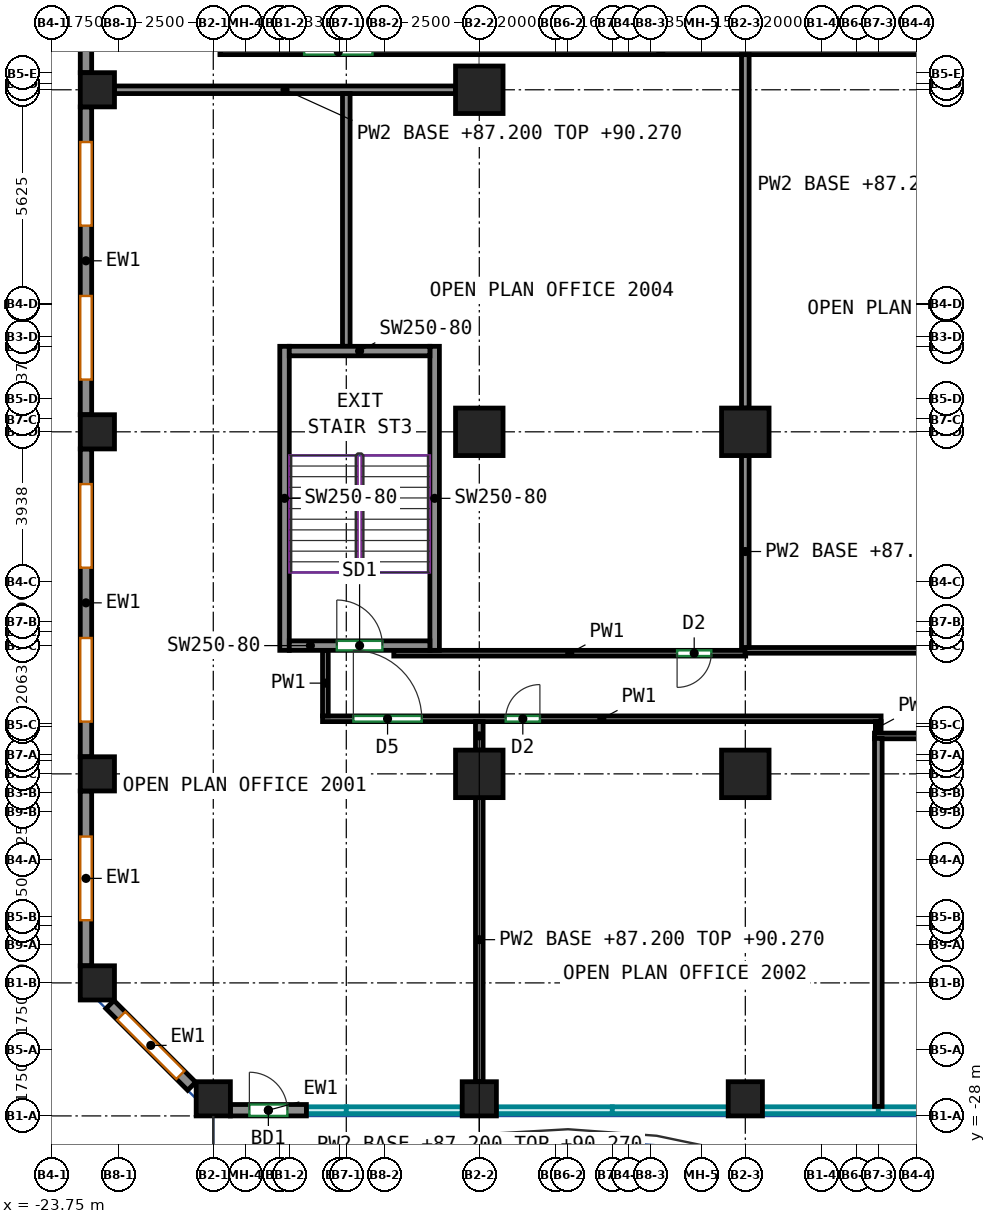
"""IFC4 building model, lengths in metres.
Left out: names, types, materials, properties, quantities, classifications, styles, units other than length and angle.
Written with IfcOpenShell. Run it as: python <this file> out.ifc"""

import sys

from ifc_helpers import new_model, si_unit, direction, frame, frame_2d, origin, origin_2d, place, context, subcontext, project, spatial, rectangle, extrude, source, transform, mapped, element, fill, save


model = new_model("IFC4")
c1 = context("Model", 3, precision=1e-05, world=origin(), true_north=direction((0.0, 1.0)))
c2 = subcontext(c1, "Body", "Model", "MODEL_VIEW")
j1 = project(units=[si_unit("LENGTHUNIT", "METRE"), si_unit("PLANEANGLEUNIT", "RADIAN")], contexts=[c1])
p1 = place(None, origin())
s1 = spatial("IfcSite", under=j1, at=p1, CompositionType="ELEMENT")
p2 = place(p1, origin())
s2 = spatial("IfcBuilding", under=s1, at=p2, CompositionType="ELEMENT")
p3 = place(p2, frame((0.0, 0.0, 87.2)))
s3 = spatial("IfcBuildingStorey", under=s2, at=p3, CompositionType="ELEMENT", Elevation=87.2)
m1 = source(origin(), c2, "Body", "SweptSolid", [
    extrude(rectangle(XDim=0.9, YDim=0.9, at=origin_2d()), origin(), (0.0, 0.0, 1.0), 3.72),
])
for number, where, z_axis, x_axis in (
    (1, (-22.55, -24.5, 0.0), (0.0, 0.0, 1.0), (1.0, 0.0, 0.0)),
    (2, (-22.55, -19.0, 0.0), (0.0, 0.0, 1.0), (1.0, 0.0, 0.0)),
    (3, (-22.55, -10.0, 0.0), (0.0, 0.0, 1.0), (1.0, 0.0, 0.0)),
    (4, (-22.55, -1.0, 0.0), (0.0, 0.0, 1.0), (1.0, 0.0, 0.0)),
    (5, (-19.5, -27.55, 0.0), (0.0, 0.0, 1.0), (1.0, 0.0, 0.0)),
    (6, (-12.5, -27.55, 0.0), (0.0, 0.0, 1.0), (1.0, 0.0, 0.0)),
):
    element("IfcColumn", number, at=place(p3, frame(where, z_axis=z_axis, x_axis=x_axis)), inside=s3, PredefinedType="COLUMN", context=c2, shape_type="MappedRepresentation", body=[
        mapped(m1, transform((0.0, 0.0, 0.0))),
    ])
m2 = source(origin(), c2, "Body", "SweptSolid", [
    extrude(rectangle(XDim=1.25, YDim=1.25, at=origin_2d()), origin(), (0.0, 0.0, 1.0), 3.72),
])
for number, where, z_axis, x_axis in (
    (7, (-12.5, -19.0, 0.0), (0.0, 0.0, 1.0), (1.0, 0.0, 0.0)),
    (8, (-12.5, -10.0, 0.0), (0.0, 0.0, 1.0), (1.0, 0.0, 0.0)),
    (9, (-12.5, -1.0, 0.0), (0.0, 0.0, 1.0), (1.0, 0.0, 0.0)),
):
    element("IfcColumn", number, at=place(p3, frame(where, z_axis=z_axis, x_axis=x_axis)), inside=s3, PredefinedType="COLUMN", context=c2, shape_type="MappedRepresentation", body=[
        mapped(m2, transform((0.0, 0.0, 0.0))),
    ])
p4 = place(p3, frame((-5.5, -27.55, 0.0), z_axis=(0.0, 0.0, 1.0), x_axis=(1.0, 0.0, 0.0)))
e10 = element("IfcColumn", 10, at=p4, inside=s3, PredefinedType="COLUMN", context=c2, shape_type="MappedRepresentation", body=[
    mapped(m1, transform((0.0, 0.0, 0.0))),
])
for number, where, z_axis, x_axis in (
    (11, (-5.5, -19.0, 0.0), (0.0, 0.0, 1.0), (1.0, 0.0, 0.0)),
    (12, (-5.5, -10.0, 0.0), (0.0, 0.0, 1.0), (1.0, 0.0, 0.0)),
):
    element("IfcColumn", number, at=place(p3, frame(where, z_axis=z_axis, x_axis=x_axis)), inside=s3, PredefinedType="COLUMN", context=c2, shape_type="MappedRepresentation", body=[
        mapped(m2, transform((0.0, 0.0, 0.0))),
    ])
m3 = source(origin(), c2, "Body", "SweptSolid", [
    extrude(rectangle(XDim=8.0, YDim=0.25, at=frame_2d((4.0, 0.0))), origin(), (0.0, 0.0, 1.0), 3.72),
])
for number, where, z_axis, x_axis in (
    (13, (-17.625, -15.75, 0.0), (0.0, 0.0, 1.0), (0.0, 1.0, 0.0)),
    (14, (-13.675, -15.75, 0.0), (0.0, 0.0, 1.0), (0.0, 1.0, 0.0)),
):
    element("IfcWall", number, at=place(p3, frame(where, z_axis=z_axis, x_axis=x_axis)), inside=s3, PredefinedType="SHEAR", context=c2, shape_type="MappedRepresentation", body=[
        mapped(m3, transform((0.0, 0.0, 0.0))),
    ])
m4 = source(origin(), c2, "Body", "SweptSolid", [
    extrude(rectangle(XDim=3.7, YDim=0.25, at=frame_2d((1.85, 0.0))), origin(), (0.0, 0.0, 1.0), 3.72),
])
p5 = place(p3, frame((-17.5, -15.625, 0.0), z_axis=(0.0, 0.0, 1.0), x_axis=(1.0, 0.0, 0.0)))
e15 = element("IfcWall", 15, at=p5, inside=s3, PredefinedType="SHEAR", context=c2, shape_type="MappedRepresentation", body=[
    mapped(m4, transform((0.0, 0.0, 0.0))),
])
p6 = place(p5, frame((1.25, 0.0, 0.0)))
e16 = element("IfcOpeningElement", 16, at=p6, cuts=e15, PredefinedType="OPENING", context=c2, shape_type="SweptSolid", body=[
    extrude(rectangle(XDim=1.2, YDim=2.1, at=frame_2d((0.6, 1.05))), frame((0.0, 0.135, 0.0), z_axis=(0.0, -1.0, 0.0), x_axis=(1.0, 0.0, 0.0)), (0.0, 0.0, 1.0), 0.27),
])
p7 = place(p3, frame((-17.5, -7.875, 0.0), z_axis=(0.0, 0.0, 1.0), x_axis=(1.0, 0.0, 0.0)))
e17 = element("IfcWall", 17, at=p7, inside=s3, PredefinedType="SHEAR", context=c2, shape_type="MappedRepresentation", body=[
    mapped(m4, transform((0.0, 0.0, 0.0))),
])
m5 = source(origin(), c2, "Body", "SweptSolid", [
    extrude(rectangle(XDim=2.0, YDim=0.3, at=frame_2d((1.0, 0.0))), origin(), (0.0, 0.0, 1.0), 3.72),
])
p8 = place(p3, frame((-19.05, -27.85, 0.0), z_axis=(0.0, 0.0, 1.0), x_axis=(1.0, 0.0, 0.0)))
e18 = element("IfcWall", 18, at=p8, inside=s3, PredefinedType="SOLIDWALL", context=c2, shape_type="MappedRepresentation", body=[
    mapped(m5, transform((0.0, 0.0, 0.0))),
])
p9 = place(p8, frame((0.5, 0.0, 0.0)))
e19 = element("IfcOpeningElement", 19, at=p9, cuts=e18, PredefinedType="OPENING", context=c2, shape_type="SweptSolid", body=[
    extrude(rectangle(XDim=1.0, YDim=2.1, at=frame_2d((0.5, 1.05))), frame((0.0, 0.16, 0.0), z_axis=(0.0, -1.0, 0.0), x_axis=(1.0, 0.0, 0.0)), (0.0, 0.0, 1.0), 0.32),
])
m6 = source(origin(), c2, "Body", "SweptSolid", [
    extrude(rectangle(XDim=8.1, YDim=0.3, at=frame_2d((4.05, 0.0))), origin(), (0.0, 0.0, 1.0), 3.72),
])
p10 = place(p3, frame((-22.85, 7.55, 0.0), z_axis=(0.0, 0.0, 1.0), x_axis=(0.0, -1.0, 0.0)))
e20 = element("IfcWall", 20, at=p10, inside=s3, PredefinedType="SOLIDWALL", context=c2, shape_type="MappedRepresentation", body=[
    mapped(m6, transform((0.0, 0.0, 0.0))),
])
p11 = place(p10, frame((0.925, 0.0, 0.7)))
e21 = element("IfcOpeningElement", 21, at=p11, cuts=e20, PredefinedType="OPENING", context=c2, shape_type="SweptSolid", body=[
    extrude(rectangle(XDim=2.2, YDim=2.25, at=frame_2d((1.1, 1.125))), frame((0.0, 0.16, 0.0), z_axis=(0.0, -1.0, 0.0), x_axis=(1.0, 0.0, 0.0)), (0.0, 0.0, 1.0), 0.32),
])
p12 = place(p10, frame((4.975, 0.0, 0.7)))
e22 = element("IfcOpeningElement", 22, at=p12, cuts=e20, PredefinedType="OPENING", context=c2, shape_type="SweptSolid", body=[
    extrude(rectangle(XDim=2.2, YDim=2.25, at=frame_2d((1.1, 1.125))), frame((0.0, 0.16, 0.0), z_axis=(0.0, -1.0, 0.0), x_axis=(1.0, 0.0, 0.0)), (0.0, 0.0, 1.0), 0.32),
])
p13 = place(p3, frame((-22.85, -1.45, 0.0), z_axis=(0.0, 0.0, 1.0), x_axis=(0.0, -1.0, 0.0)))
e23 = element("IfcWall", 23, at=p13, inside=s3, PredefinedType="SOLIDWALL", context=c2, shape_type="MappedRepresentation", body=[
    mapped(m6, transform((0.0, 0.0, 0.0))),
])
p14 = place(p13, frame((0.925, 0.0, 0.7)))
e24 = element("IfcOpeningElement", 24, at=p14, cuts=e23, PredefinedType="OPENING", context=c2, shape_type="SweptSolid", body=[
    extrude(rectangle(XDim=2.2, YDim=2.25, at=frame_2d((1.1, 1.125))), frame((0.0, 0.16, 0.0), z_axis=(0.0, -1.0, 0.0), x_axis=(1.0, 0.0, 0.0)), (0.0, 0.0, 1.0), 0.32),
])
p15 = place(p13, frame((4.975, 0.0, 0.7)))
e25 = element("IfcOpeningElement", 25, at=p15, cuts=e23, PredefinedType="OPENING", context=c2, shape_type="SweptSolid", body=[
    extrude(rectangle(XDim=2.2, YDim=2.25, at=frame_2d((1.1, 1.125))), frame((0.0, 0.16, 0.0), z_axis=(0.0, -1.0, 0.0), x_axis=(1.0, 0.0, 0.0)), (0.0, 0.0, 1.0), 0.32),
])
p16 = place(p3, frame((-22.85, -10.45, 0.0), z_axis=(0.0, 0.0, 1.0), x_axis=(0.0, -1.0, 0.0)))
e26 = element("IfcWall", 26, at=p16, inside=s3, PredefinedType="SOLIDWALL", context=c2, shape_type="MappedRepresentation", body=[
    mapped(m6, transform((0.0, 0.0, 0.0))),
])
p17 = place(p16, frame((0.925, 0.0, 0.7)))
e27 = element("IfcOpeningElement", 27, at=p17, cuts=e26, PredefinedType="OPENING", context=c2, shape_type="SweptSolid", body=[
    extrude(rectangle(XDim=2.2, YDim=2.25, at=frame_2d((1.1, 1.125))), frame((0.0, 0.16, 0.0), z_axis=(0.0, -1.0, 0.0), x_axis=(1.0, 0.0, 0.0)), (0.0, 0.0, 1.0), 0.32),
])
p18 = place(p16, frame((4.975, 0.0, 0.7)))
e28 = element("IfcOpeningElement", 28, at=p18, cuts=e26, PredefinedType="OPENING", context=c2, shape_type="SweptSolid", body=[
    extrude(rectangle(XDim=2.2, YDim=2.25, at=frame_2d((1.1, 1.125))), frame((0.0, 0.16, 0.0), z_axis=(0.0, -1.0, 0.0), x_axis=(1.0, 0.0, 0.0)), (0.0, 0.0, 1.0), 0.32),
])
m7 = source(origin(), c2, "Body", "SweptSolid", [
    extrude(rectangle(XDim=4.6, YDim=0.3, at=frame_2d((2.3, 0.0))), origin(), (0.0, 0.0, 1.0), 3.72),
])
p19 = place(p3, frame((-22.85, -19.45, 0.0), z_axis=(0.0, 0.0, 1.0), x_axis=(0.0, -1.0, 0.0)))
e29 = element("IfcWall", 29, at=p19, inside=s3, PredefinedType="SOLIDWALL", context=c2, shape_type="MappedRepresentation", body=[
    mapped(m7, transform((0.0, 0.0, 0.0))),
])
p20 = place(p19, frame((1.2, 0.0, 0.7)))
e30 = element("IfcOpeningElement", 30, at=p20, cuts=e29, PredefinedType="OPENING", context=c2, shape_type="SweptSolid", body=[
    extrude(rectangle(XDim=2.2, YDim=2.25, at=frame_2d((1.1, 1.125))), frame((0.0, 0.16, 0.0), z_axis=(0.0, -1.0, 0.0), x_axis=(1.0, 0.0, 0.0)), (0.0, 0.0, 1.0), 0.32),
])
m8 = source(origin(), c2, "Body", "SweptSolid", [
    extrude(rectangle(XDim=3.041, YDim=0.3, at=frame_2d((1.521, 0.0))), origin(), (0.0, 0.0, 1.0), 3.72),
])
p21 = place(p3, frame((-22.219, -25.069, 0.0), z_axis=(0.0, 0.0, 1.0), x_axis=(0.707106781187, -0.707106781187, 0.0)))
e31 = element("IfcWall", 31, at=p21, inside=s3, PredefinedType="SOLIDWALL", context=c2, shape_type="MappedRepresentation", body=[
    mapped(m8, transform((0.0, 0.0, 0.0))),
])
p22 = place(p21, frame((0.42, 0.0, 0.7)))
e32 = element("IfcOpeningElement", 32, at=p22, cuts=e31, PredefinedType="OPENING", context=c2, shape_type="SweptSolid", body=[
    extrude(rectangle(XDim=2.2, YDim=2.25, at=frame_2d((1.1, 1.125))), frame((0.0, 0.16, 0.0), z_axis=(0.0, -1.0, 0.0), x_axis=(1.0, 0.0, 0.0)), (0.0, 0.0, 1.0), 0.32),
])
p23 = place(p3, frame((-16.625, -17.55, 0.0), z_axis=(0.0, 0.0, 1.0), x_axis=(1.0, 0.0, 0.0)))
e33 = element("IfcWall", 33, at=p23, inside=s3, PredefinedType="PARTITIONING", context=c2, shape_type="SweptSolid", body=[
    extrude(rectangle(XDim=14.698, YDim=0.15, at=frame_2d((7.349, 0.0))), origin(), (0.0, 0.0, 1.0), 3.72),
])
p24 = place(p23, frame((0.811, 0.0, 0.0)))
e34 = element("IfcOpeningElement", 34, at=p24, cuts=e33, PredefinedType="OPENING", context=c2, shape_type="SweptSolid", body=[
    extrude(rectangle(XDim=1.8, YDim=2.1, at=frame_2d((0.9, 1.05))), frame((0.0, 0.085, 0.0), z_axis=(0.0, -1.0, 0.0), x_axis=(1.0, 0.0, 0.0)), (0.0, 0.0, 1.0), 0.17),
])
p25 = place(p23, frame((4.82, 0.0, 0.0)))
e35 = element("IfcOpeningElement", 35, at=p25, cuts=e33, PredefinedType="OPENING", context=c2, shape_type="SweptSolid", body=[
    extrude(rectangle(XDim=0.9, YDim=2.1, at=frame_2d((0.45, 1.05))), frame((0.0, 0.085, 0.0), z_axis=(0.0, -1.0, 0.0), x_axis=(1.0, 0.0, 0.0)), (0.0, 0.0, 1.0), 0.17),
])
p26 = place(p3, frame((-16.55, -15.75, 0.0), z_axis=(0.0, 0.0, 1.0), x_axis=(0.0, -1.0, 0.0)))
e36 = element("IfcWall", 36, at=p26, inside=s3, PredefinedType="PARTITIONING", context=c2, shape_type="SweptSolid", body=[
    extrude(rectangle(XDim=1.725, YDim=0.15, at=frame_2d((0.863, 0.0))), origin(), (0.0, 0.0, 1.0), 3.72),
])
p27 = place(p3, frame((-2.002, -17.625, 0.0), z_axis=(0.0, 0.0, 1.0), x_axis=(0.0, -1.0, 0.0)))
e37 = element("IfcWall", 37, at=p27, inside=s3, PredefinedType="PARTITIONING", context=c2, shape_type="SweptSolid", body=[
    extrude(rectangle(XDim=0.302, YDim=0.15, at=frame_2d((0.151, 0.0))), origin(), (0.0, 0.0, 1.0), 3.72),
])
p28 = place(p3, frame((-2.102, -18.002, 0.0), z_axis=(0.0, 0.0, 1.0), x_axis=(1.0, 0.0, 0.0)))
e38 = element("IfcWall", 38, at=p28, inside=s3, PredefinedType="PARTITIONING", context=c2, shape_type="SweptSolid", body=[
    extrude(rectangle(XDim=5.904, YDim=0.15, at=frame_2d((2.952, 0.0))), origin(), (0.0, 0.0, 1.0), 3.72),
])
p29 = place(p28, frame((1.901, 0.0, 0.0)))
e39 = element("IfcOpeningElement", 39, at=p29, cuts=e38, PredefinedType="OPENING", context=c2, shape_type="SweptSolid", body=[
    extrude(rectangle(XDim=0.9, YDim=2.1, at=frame_2d((0.45, 1.05))), frame((0.0, 0.085, 0.0), z_axis=(0.0, -1.0, 0.0), x_axis=(1.0, 0.0, 0.0)), (0.0, 0.0, 1.0), 0.17),
])
p30 = place(p3, frame((-19.325, 0.0, 0.0), z_axis=(0.0, 0.0, 1.0), x_axis=(1.0, 0.0, 0.0)))
e40 = element("IfcWall", 40, at=p30, inside=s3, PredefinedType="PARTITIONING", context=c2, shape_type="SweptSolid", body=[
    extrude(rectangle(XDim=23.2, YDim=0.15, at=frame_2d((11.6, 0.0))), origin(), (0.0, 0.0, 1.0), 3.72),
])
p31 = place(p30, frame((2.215, 0.0, 0.0)))
e41 = element("IfcOpeningElement", 41, at=p31, cuts=e40, PredefinedType="OPENING", context=c2, shape_type="SweptSolid", body=[
    extrude(rectangle(XDim=1.8, YDim=2.1, at=frame_2d((0.9, 1.05))), frame((0.0, 0.085, 0.0), z_axis=(0.0, -1.0, 0.0), x_axis=(1.0, 0.0, 0.0)), (0.0, 0.0, 1.0), 0.17),
])
p32 = place(p3, frame((-5.49, -15.825, 0.0), z_axis=(0.0, 0.0, 1.0), x_axis=(-1.0, 0.0, 0.0)))
e42 = element("IfcWall", 42, at=p32, inside=s3, PredefinedType="PARTITIONING", context=c2, shape_type="SweptSolid", body=[
    extrude(rectangle(XDim=9.26, YDim=0.15, at=frame_2d((4.63, 0.0))), origin(), (0.0, 0.0, 1.0), 3.72),
])
p33 = place(p32, frame((0.905, 0.0, 0.0)))
e43 = element("IfcOpeningElement", 43, at=p33, cuts=e42, PredefinedType="OPENING", context=c2, shape_type="SweptSolid", body=[
    extrude(rectangle(XDim=0.9, YDim=2.1, at=frame_2d((0.45, 1.05))), frame((0.0, 0.085, 0.0), z_axis=(0.0, -1.0, 0.0), x_axis=(1.0, 0.0, 0.0)), (0.0, 0.0, 1.0), 0.17),
])
p34 = place(p3, frame((3.875, -15.75, 0.0), z_axis=(0.0, 0.0, 1.0), x_axis=(-1.0, 0.0, 0.0)))
e44 = element("IfcWall", 44, at=p34, inside=s3, PredefinedType="PARTITIONING", context=c2, shape_type="SweptSolid", body=[
    extrude(rectangle(XDim=9.385, YDim=0.15, at=frame_2d((4.692, 0.0))), origin(), (0.0, 0.0, 1.0), 3.72),
])
p35 = place(p3, frame((-12.5, -18.375, 0.0), z_axis=(0.0, 0.0, 1.0), x_axis=(0.0, 1.0, 0.0)))
e45 = element("IfcWall", 45, at=p35, inside=s3, PredefinedType="PARTITIONING", context=c2, shape_type="SweptSolid", body=[
    extrude(rectangle(XDim=0.749, YDim=0.2, at=frame_2d((0.375, 0.0))), origin(), (0.0, 0.0, 1.0), 3.07),
])
p36 = place(p3, frame((-12.5, -27.1, 0.0), z_axis=(0.0, 0.0, 1.0), x_axis=(0.0, 1.0, 0.0)))
e46 = element("IfcWall", 46, at=p36, inside=s3, PredefinedType="PARTITIONING", context=c2, shape_type="SweptSolid", body=[
    extrude(rectangle(XDim=7.475, YDim=0.2, at=frame_2d((3.738, 0.0))), origin(), (0.0, 0.0, 1.0), 3.07),
])
p37 = place(p3, frame((-22.1, -1.0, 0.0), z_axis=(0.0, 0.0, 1.0), x_axis=(1.0, 0.0, 0.0)))
e47 = element("IfcWall", 47, at=p37, inside=s3, PredefinedType="PARTITIONING", context=c2, shape_type="SweptSolid", body=[
    extrude(rectangle(XDim=8.975, YDim=0.2, at=frame_2d((4.488, 0.0))), origin(), (0.0, 0.0, 1.0), 3.07),
])
p38 = place(p3, frame((-16.0, -7.75, 0.0), z_axis=(0.0, 0.0, 1.0), x_axis=(0.0, 1.0, 0.0)))
e48 = element("IfcWall", 48, at=p38, inside=s3, PredefinedType="PARTITIONING", context=c2, shape_type="SweptSolid", body=[
    extrude(rectangle(XDim=6.65, YDim=0.2, at=frame_2d((3.325, 0.0))), origin(), (0.0, 0.0, 1.0), 3.72),
])
p39 = place(p3, frame((-2.0, -27.75, 0.0), z_axis=(0.0, 0.0, 1.0), x_axis=(0.0, 1.0, 0.0)))
e49 = element("IfcWall", 49, at=p39, inside=s3, PredefinedType="PARTITIONING", context=c2, shape_type="SweptSolid", body=[
    extrude(rectangle(XDim=9.683, YDim=0.2, at=frame_2d((4.842, 0.0))), origin(), (0.0, 0.0, 1.0), 3.72),
])
p40 = place(p3, frame((-5.5, -9.375, 0.0), z_axis=(0.0, 0.0, 1.0), x_axis=(0.0, 1.0, 0.0)))
e50 = element("IfcWall", 50, at=p40, inside=s3, PredefinedType="PARTITIONING", context=c2, shape_type="SweptSolid", body=[
    extrude(rectangle(XDim=9.299, YDim=0.2, at=frame_2d((4.649, 0.0))), origin(), (0.0, 0.0, 1.0), 3.72),
])
p41 = place(p3, frame((-5.5, -15.674, 0.0), z_axis=(0.0, 0.0, 1.0), x_axis=(0.0, 1.0, 0.0)))
e51 = element("IfcWall", 51, at=p41, inside=s3, PredefinedType="PARTITIONING", context=c2, shape_type="SweptSolid", body=[
    extrude(rectangle(XDim=5.049, YDim=0.2, at=frame_2d((2.524, 0.0))), origin(), (0.0, 0.0, 1.0), 3.07),
])
p42 = place(p9, origin())
e52 = element("IfcDoor", 52, at=p42, inside=s3, OperationType="SINGLE_SWING_LEFT", PredefinedType="DOOR", context=c2, shape_type="SweptSolid", body=[
    extrude(rectangle(XDim=1.0, YDim=2.1, at=frame_2d((0.5, 1.05))), frame((0.0, 0.025, 0.0), z_axis=(0.0, -1.0, 0.0), x_axis=(1.0, 0.0, 0.0)), (0.0, 0.0, 1.0), 0.05),
])
fill(e19, e52)
p43 = place(p14, origin())
e53 = element("IfcWindow", 53, at=p43, inside=s3, PartitioningType="SINGLE_PANEL", PredefinedType="WINDOW", context=c2, shape_type="SweptSolid", body=[
    extrude(rectangle(XDim=2.2, YDim=2.25, at=frame_2d((1.1, 1.125))), frame((0.0, 0.03, 0.0), z_axis=(0.0, -1.0, 0.0), x_axis=(1.0, 0.0, 0.0)), (0.0, 0.0, 1.0), 0.06),
])
fill(e24, e53)
p44 = place(p15, origin())
e54 = element("IfcWindow", 54, at=p44, inside=s3, PartitioningType="SINGLE_PANEL", PredefinedType="WINDOW", context=c2, shape_type="SweptSolid", body=[
    extrude(rectangle(XDim=2.2, YDim=2.25, at=frame_2d((1.1, 1.125))), frame((0.0, 0.03, 0.0), z_axis=(0.0, -1.0, 0.0), x_axis=(1.0, 0.0, 0.0)), (0.0, 0.0, 1.0), 0.06),
])
fill(e25, e54)
p45 = place(p17, origin())
e55 = element("IfcWindow", 55, at=p45, inside=s3, PartitioningType="SINGLE_PANEL", PredefinedType="WINDOW", context=c2, shape_type="SweptSolid", body=[
    extrude(rectangle(XDim=2.2, YDim=2.25, at=frame_2d((1.1, 1.125))), frame((0.0, 0.03, 0.0), z_axis=(0.0, -1.0, 0.0), x_axis=(1.0, 0.0, 0.0)), (0.0, 0.0, 1.0), 0.06),
])
fill(e27, e55)
p46 = place(p18, origin())
e56 = element("IfcWindow", 56, at=p46, inside=s3, PartitioningType="SINGLE_PANEL", PredefinedType="WINDOW", context=c2, shape_type="SweptSolid", body=[
    extrude(rectangle(XDim=2.2, YDim=2.25, at=frame_2d((1.1, 1.125))), frame((0.0, 0.03, 0.0), z_axis=(0.0, -1.0, 0.0), x_axis=(1.0, 0.0, 0.0)), (0.0, 0.0, 1.0), 0.06),
])
fill(e28, e56)
p47 = place(p20, origin())
e57 = element("IfcWindow", 57, at=p47, inside=s3, PartitioningType="SINGLE_PANEL", PredefinedType="WINDOW", context=c2, shape_type="SweptSolid", body=[
    extrude(rectangle(XDim=2.2, YDim=2.25, at=frame_2d((1.1, 1.125))), frame((0.0, 0.03, 0.0), z_axis=(0.0, -1.0, 0.0), x_axis=(1.0, 0.0, 0.0)), (0.0, 0.0, 1.0), 0.06),
])
fill(e30, e57)
p48 = place(p22, origin())
e58 = element("IfcWindow", 58, at=p48, inside=s3, PartitioningType="SINGLE_PANEL", PredefinedType="WINDOW", context=c2, shape_type="SweptSolid", body=[
    extrude(rectangle(XDim=2.2, YDim=2.25, at=frame_2d((1.1, 1.125))), frame((0.0, 0.03, 0.0), z_axis=(0.0, -1.0, 0.0), x_axis=(1.0, 0.0, 0.0)), (0.0, 0.0, 1.0), 0.06),
])
fill(e32, e58)
p49 = place(p6, origin())
e59 = element("IfcDoor", 59, at=p49, inside=s3, OperationType="DOUBLE_DOOR_SINGLE_SWING", PredefinedType="DOOR", context=c2, shape_type="SweptSolid", body=[
    extrude(rectangle(XDim=1.2, YDim=2.1, at=frame_2d((0.6, 1.05))), frame((0.0, 0.025, 0.0), z_axis=(0.0, -1.0, 0.0), x_axis=(1.0, 0.0, 0.0)), (0.0, 0.0, 1.0), 0.05),
])
fill(e16, e59)
p50 = place(p24, origin())
e60 = element("IfcDoor", 60, at=p50, inside=s3, OperationType="DOUBLE_DOOR_SINGLE_SWING", PredefinedType="DOOR", context=c2, shape_type="SweptSolid", body=[
    extrude(rectangle(XDim=1.8, YDim=2.1, at=frame_2d((0.9, 1.05))), frame((0.0, 0.025, 0.0), z_axis=(0.0, -1.0, 0.0), x_axis=(1.0, 0.0, 0.0)), (0.0, 0.0, 1.0), 0.05),
])
fill(e34, e60)
p51 = place(p25, origin())
e61 = element("IfcDoor", 61, at=p51, inside=s3, OperationType="SINGLE_SWING_RIGHT", PredefinedType="DOOR", context=c2, shape_type="SweptSolid", body=[
    extrude(rectangle(XDim=0.9, YDim=2.1, at=frame_2d((0.45, 1.05))), frame((0.0, 0.025, 0.0), z_axis=(0.0, -1.0, 0.0), x_axis=(1.0, 0.0, 0.0)), (0.0, 0.0, 1.0), 0.05),
])
fill(e35, e61)
p52 = place(p33, origin())
e62 = element("IfcDoor", 62, at=p52, inside=s3, OperationType="SINGLE_SWING_RIGHT", PredefinedType="DOOR", context=c2, shape_type="SweptSolid", body=[
    extrude(rectangle(XDim=0.9, YDim=2.1, at=frame_2d((0.45, 1.05))), frame((0.0, 0.025, 0.0), z_axis=(0.0, -1.0, 0.0), x_axis=(1.0, 0.0, 0.0)), (0.0, 0.0, 1.0), 0.05),
])
fill(e43, e62)
p53 = place(p31, origin())
e63 = element("IfcDoor", 63, at=p53, inside=s3, OperationType="DOUBLE_DOOR_SINGLE_SWING", PredefinedType="DOOR", context=c2, shape_type="SweptSolid", body=[
    extrude(rectangle(XDim=1.8, YDim=2.1, at=frame_2d((0.9, 1.05))), frame((0.0, 0.025, 0.0), z_axis=(0.0, -1.0, 0.0), x_axis=(1.0, 0.0, 0.0)), (0.0, 0.0, 1.0), 0.05),
])
fill(e41, e63)
save(model, sys.argv[1])
